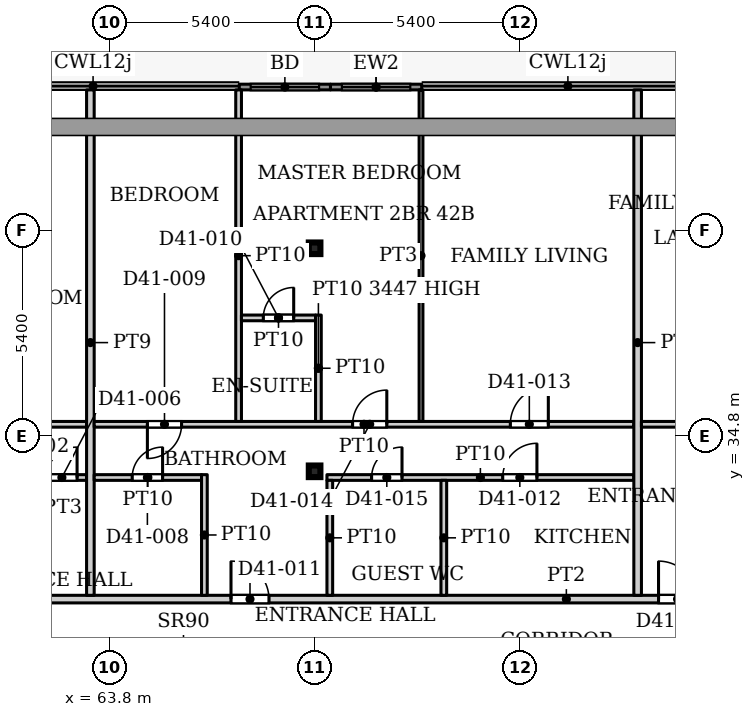
"""IFC4 building model, lengths in metres.
Left out: names, types, materials, properties, quantities, classifications, styles, units other than length and angle.
Written with IfcOpenShell. Run it as: python <this file> out.ifc"""

import sys

from ifc_helpers import new_model, si_unit, direction, frame, frame_2d, origin, origin_2d, place, context, subcontext, project, spatial, rectangle, hollow_rectangle, extrude, source, transform, mapped, element, fill, save


model = new_model("IFC4")
c1 = context("Model", 3, precision=1e-05, world=origin(), true_north=direction((0.0, 1.0)))
c2 = subcontext(c1, "Body", "Model", "MODEL_VIEW")
j1 = project(units=[si_unit("LENGTHUNIT", "METRE"), si_unit("PLANEANGLEUNIT", "RADIAN")], contexts=[c1])
p1 = place(None, origin())
s1 = spatial("IfcSite", under=j1, at=p1, CompositionType="ELEMENT")
p2 = place(p1, origin())
s2 = spatial("IfcBuilding", under=s1, at=p2, CompositionType="ELEMENT")
p3 = place(p2, frame((0.0, 0.0, 179.9)))
s3 = spatial("IfcBuildingStorey", under=s2, at=p3, CompositionType="ELEMENT", Elevation=179.9)
for number, where, z_axis, x_axis in (
    (1, (69.2, 33.863, 0.0), (0.0, 0.0, 1.0), (1.0, 0.0, 0.0)),
    (2, (69.2, 39.732, 0.0), (0.0, 0.0, 1.0), (1.0, 0.0, 0.0)),
):
    element("IfcColumn", number, at=place(p3, frame(where, z_axis=z_axis, x_axis=x_axis)), inside=s3, PredefinedType="COLUMN", context=c2, shape_type="SweptSolid", body=[
        extrude(hollow_rectangle(XDim=0.305, YDim=0.305, WallThickness=0.016, InnerFilletRadius=0.016, OuterFilletRadius=0.032, at=origin_2d()), origin(), (0.0, 0.0, 1.0), 3.9),
    ])
p4 = place(p3, frame((67.218, 43.975, 0.0), z_axis=(0.0, 0.0, 1.0), x_axis=(1.0, 0.0, 0.0)))
e3 = element("IfcWall", 3, at=p4, inside=s3, PredefinedType="SOLIDWALL", context=c2, shape_type="SweptSolid", body=[
    extrude(rectangle(XDim=2.4, YDim=0.15, at=frame_2d((1.2, 0.0))), origin(), (0.0, 0.0, 1.0), 3.75),
])
p5 = place(p4, frame((0.3, 0.0, 0.0)))
e4 = element("IfcOpeningElement", 4, at=p5, cuts=e3, PredefinedType="OPENING", context=c2, shape_type="SweptSolid", body=[
    extrude(rectangle(XDim=1.8, YDim=2.4, at=frame_2d((0.9, 1.2))), frame((0.0, 0.085, 0.0), z_axis=(0.0, -1.0, 0.0), x_axis=(1.0, 0.0, 0.0)), (0.0, 0.0, 1.0), 0.17),
])
p6 = place(p3, frame((69.618, 43.975, 0.0), z_axis=(0.0, 0.0, 1.0), x_axis=(1.0, 0.0, 0.0)))
e5 = element("IfcWall", 5, at=p6, inside=s3, PredefinedType="SOLIDWALL", context=c2, shape_type="SweptSolid", body=[
    extrude(rectangle(XDim=2.4, YDim=0.15, at=frame_2d((1.2, 0.0))), origin(), (0.0, 0.0, 1.0), 3.75),
])
p7 = place(p6, frame((0.3, 0.0, 0.0)))
e6 = element("IfcOpeningElement", 6, at=p7, cuts=e5, PredefinedType="OPENING", context=c2, shape_type="SweptSolid", body=[
    extrude(rectangle(XDim=1.8, YDim=2.4, at=frame_2d((0.9, 1.2))), frame((0.0, 0.085, 0.0), z_axis=(0.0, -1.0, 0.0), x_axis=(1.0, 0.0, 0.0)), (0.0, 0.0, 1.0), 0.17),
])
p8 = place(p3, frame((53.549, 30.5, 0.0), z_axis=(0.0, 0.0, 1.0), x_axis=(1.0, 0.0, 0.0)))
e7 = element("IfcWall", 7, at=p8, inside=s3, PredefinedType="PARTITIONING", context=c2, shape_type="SweptSolid", body=[
    extrude(rectangle(XDim=44.551, YDim=0.2, at=frame_2d((22.275, 0.0))), origin(), (0.0, 0.0, 1.0), 3.6),
])
p9 = place(p8, frame((6.851, 0.0, 0.0)))
e8 = element("IfcOpeningElement", 8, at=p9, cuts=e7, PredefinedType="OPENING", context=c2, shape_type="SweptSolid", body=[
    extrude(rectangle(XDim=1.0, YDim=2.1, at=frame_2d((0.5, 1.05))), frame((0.0, 0.11, 0.0), z_axis=(0.0, -1.0, 0.0), x_axis=(1.0, 0.0, 0.0)), (0.0, 0.0, 1.0), 0.22),
])
p10 = place(p8, frame((13.451, 0.0, 0.0)))
e9 = element("IfcOpeningElement", 9, at=p10, cuts=e7, PredefinedType="OPENING", context=c2, shape_type="SweptSolid", body=[
    extrude(rectangle(XDim=1.0, YDim=2.1, at=frame_2d((0.5, 1.05))), frame((0.0, 0.11, 0.0), z_axis=(0.0, -1.0, 0.0), x_axis=(1.0, 0.0, 0.0)), (0.0, 0.0, 1.0), 0.22),
])
p11 = place(p8, frame((24.701, 0.0, 0.0)))
e10 = element("IfcOpeningElement", 10, at=p11, cuts=e7, PredefinedType="OPENING", context=c2, shape_type="SweptSolid", body=[
    extrude(rectangle(XDim=1.0, YDim=2.1, at=frame_2d((0.5, 1.05))), frame((0.0, 0.11, 0.0), z_axis=(0.0, -1.0, 0.0), x_axis=(1.0, 0.0, 0.0)), (0.0, 0.0, 1.0), 0.22),
])
p12 = place(p8, frame((38.651, 0.0, 0.0)))
e11 = element("IfcOpeningElement", 11, at=p12, cuts=e7, PredefinedType="OPENING", context=c2, shape_type="SweptSolid", body=[
    extrude(rectangle(XDim=1.0, YDim=2.1, at=frame_2d((0.5, 1.05))), frame((0.0, 0.11, 0.0), z_axis=(0.0, -1.0, 0.0), x_axis=(1.0, 0.0, 0.0)), (0.0, 0.0, 1.0), 0.22),
])
p13 = place(p3, frame((53.549, 35.1, 0.0), z_axis=(0.0, 0.0, 1.0), x_axis=(1.0, 0.0, 0.0)))
e12 = element("IfcWall", 12, at=p13, inside=s3, PredefinedType="PARTITIONING", context=c2, shape_type="SweptSolid", body=[
    extrude(rectangle(XDim=9.651, YDim=0.15, at=frame_2d((4.825, 0.0))), origin(), (0.0, 0.0, 1.0), 3.6),
])
p14 = place(p13, frame((7.651, 0.0, 0.0)))
e13 = element("IfcOpeningElement", 13, at=p14, cuts=e12, PredefinedType="OPENING", context=c2, shape_type="SweptSolid", body=[
    extrude(rectangle(XDim=0.9, YDim=2.1, at=frame_2d((0.45, 1.05))), frame((0.0, 0.085, 0.0), z_axis=(0.0, -1.0, 0.0), x_axis=(1.0, 0.0, 0.0)), (0.0, 0.0, 1.0), 0.17),
])
p15 = place(p13, frame((2.651, 0.0, 0.0)))
e14 = element("IfcOpeningElement", 14, at=p15, cuts=e12, PredefinedType="OPENING", context=c2, shape_type="SweptSolid", body=[
    extrude(rectangle(XDim=1.0, YDim=2.1, at=frame_2d((0.5, 1.05))), frame((0.0, 0.085, 0.0), z_axis=(0.0, -1.0, 0.0), x_axis=(1.0, 0.0, 0.0)), (0.0, 0.0, 1.0), 0.17),
])
p16 = place(p3, frame((61.75, 33.7, 0.0), z_axis=(0.0, 0.0, 1.0), x_axis=(1.0, 0.0, 0.0)))
e15 = element("IfcWall", 15, at=p16, inside=s3, PredefinedType="PARTITIONING", context=c2, shape_type="SweptSolid", body=[
    extrude(rectangle(XDim=1.45, YDim=0.15, at=frame_2d((0.725, 0.0))), origin(), (0.0, 0.0, 1.0), 3.6),
])
p17 = place(p16, frame((0.4, 0.0, 0.0)))
e16 = element("IfcOpeningElement", 16, at=p17, cuts=e15, PredefinedType="OPENING", context=c2, shape_type="SweptSolid", body=[
    extrude(rectangle(XDim=0.8, YDim=2.1, at=frame_2d((0.4, 1.05))), frame((0.0, 0.085, 0.0), z_axis=(0.0, -1.0, 0.0), x_axis=(1.0, 0.0, 0.0)), (0.0, 0.0, 1.0), 0.17),
])
p18 = place(p3, frame((63.3, 30.6, 0.0), z_axis=(0.0, 0.0, 1.0), x_axis=(0.0, 1.0, 0.0)))
e17 = element("IfcWall", 17, at=p18, inside=s3, PredefinedType="PARTITIONING", context=c2, shape_type="SweptSolid", body=[
    extrude(rectangle(XDim=13.3, YDim=0.2, at=frame_2d((6.65, 0.0))), origin(), (0.0, 0.0, 1.0), 3.6),
])
p19 = place(p3, frame((63.4, 33.7, 0.0), z_axis=(0.0, 0.0, 1.0), x_axis=(1.0, 0.0, 0.0)))
e18 = element("IfcWall", 18, at=p19, inside=s3, PredefinedType="PARTITIONING", context=c2, shape_type="SweptSolid", body=[
    extrude(rectangle(XDim=2.825, YDim=0.15, at=frame_2d((1.413, 0.0))), origin(), (0.0, 0.0, 1.0), 3.6),
])
p20 = place(p19, frame((1.0, 0.0, 0.0)))
e19 = element("IfcOpeningElement", 19, at=p20, cuts=e18, PredefinedType="OPENING", context=c2, shape_type="SweptSolid", body=[
    extrude(rectangle(XDim=0.8, YDim=2.1, at=frame_2d((0.4, 1.05))), frame((0.0, 0.085, 0.0), z_axis=(0.0, -1.0, 0.0), x_axis=(1.0, 0.0, 0.0)), (0.0, 0.0, 1.0), 0.17),
])
p21 = place(p3, frame((63.4, 35.1, 0.0), z_axis=(0.0, 0.0, 1.0), x_axis=(1.0, 0.0, 0.0)))
e20 = element("IfcWall", 20, at=p21, inside=s3, PredefinedType="PARTITIONING", context=c2, shape_type="SweptSolid", body=[
    extrude(rectangle(XDim=14.2, YDim=0.15, at=frame_2d((7.1, 0.0))), origin(), (0.0, 0.0, 1.0), 3.6),
])
p22 = place(p21, frame((1.4, 0.0, 0.0)))
e21 = element("IfcOpeningElement", 21, at=p22, cuts=e20, PredefinedType="OPENING", context=c2, shape_type="SweptSolid", body=[
    extrude(rectangle(XDim=0.9, YDim=2.1, at=frame_2d((0.45, 1.05))), frame((0.0, 0.085, 0.0), z_axis=(0.0, -1.0, 0.0), x_axis=(1.0, 0.0, 0.0)), (0.0, 0.0, 1.0), 0.17),
])
p23 = place(p21, frame((10.95, 0.0, 0.0)))
e22 = element("IfcOpeningElement", 22, at=p23, cuts=e20, PredefinedType="OPENING", context=c2, shape_type="SweptSolid", body=[
    extrude(rectangle(XDim=1.0, YDim=2.1, at=frame_2d((0.5, 1.05))), frame((0.0, 0.085, 0.0), z_axis=(0.0, -1.0, 0.0), x_axis=(1.0, 0.0, 0.0)), (0.0, 0.0, 1.0), 0.17),
])
p24 = place(p21, frame((6.8, 0.0, 0.0)))
e23 = element("IfcOpeningElement", 23, at=p24, cuts=e20, PredefinedType="OPENING", context=c2, shape_type="SweptSolid", body=[
    extrude(rectangle(XDim=0.9, YDim=2.1, at=frame_2d((0.45, 1.05))), frame((0.0, 0.085, 0.0), z_axis=(0.0, -1.0, 0.0), x_axis=(1.0, 0.0, 0.0)), (0.0, 0.0, 1.0), 0.17),
])
p25 = place(p3, frame((66.3, 30.6, 0.0), z_axis=(0.0, 0.0, 1.0), x_axis=(0.0, 1.0, 0.0)))
e24 = element("IfcWall", 24, at=p25, inside=s3, PredefinedType="PARTITIONING", context=c2, shape_type="SweptSolid", body=[
    extrude(rectangle(XDim=3.175, YDim=0.15, at=frame_2d((1.587, 0.0))), origin(), (0.0, 0.0, 1.0), 3.6),
])
p26 = place(p3, frame((67.2, 35.175, 0.0), z_axis=(0.0, 0.0, 1.0), x_axis=(0.0, 1.0, 0.0)))
e25 = element("IfcWall", 25, at=p26, inside=s3, PredefinedType="PARTITIONING", context=c2, shape_type="SweptSolid", body=[
    extrude(rectangle(XDim=8.725, YDim=0.15, at=frame_2d((4.362, 0.0))), origin(), (0.0, 0.0, 1.0), 3.6),
])
p27 = place(p3, frame((67.275, 37.9, 0.0), z_axis=(0.0, 0.0, 1.0), x_axis=(1.0, 0.0, 0.0)))
e26 = element("IfcWall", 26, at=p27, inside=s3, PredefinedType="PARTITIONING", context=c2, shape_type="SweptSolid", body=[
    extrude(rectangle(XDim=1.95, YDim=0.15, at=frame_2d((0.975, 0.0))), origin(), (0.0, 0.0, 1.0), 3.6),
])
p28 = place(p27, frame((0.575, 0.0, 0.0)))
e27 = element("IfcOpeningElement", 27, at=p28, cuts=e26, PredefinedType="OPENING", context=c2, shape_type="SweptSolid", body=[
    extrude(rectangle(XDim=0.8, YDim=2.1, at=frame_2d((0.4, 1.05))), frame((0.0, 0.085, 0.0), z_axis=(0.0, -1.0, 0.0), x_axis=(1.0, 0.0, 0.0)), (0.0, 0.0, 1.0), 0.17),
])
p29 = place(p3, frame((69.3, 35.175, 0.0), z_axis=(0.0, 0.0, 1.0), x_axis=(0.0, 1.0, 0.0)))
e28 = element("IfcWall", 28, at=p29, inside=s3, PredefinedType="PARTITIONING", context=c2, shape_type="SweptSolid", body=[
    extrude(rectangle(XDim=2.8, YDim=0.15, at=frame_2d((1.4, 0.0))), origin(), (0.0, 0.0, 1.0), 3.447),
])
p30 = place(p3, frame((69.525, 33.7, 0.0), z_axis=(0.0, 0.0, 1.0), x_axis=(1.0, 0.0, 0.0)))
e29 = element("IfcWall", 29, at=p30, inside=s3, PredefinedType="PARTITIONING", context=c2, shape_type="SweptSolid", body=[
    extrude(rectangle(XDim=8.075, YDim=0.15, at=frame_2d((4.038, 0.0))), origin(), (0.0, 0.0, 1.0), 3.6),
])
p31 = place(p30, frame((4.625, 0.0, 0.0)))
e30 = element("IfcOpeningElement", 30, at=p31, cuts=e29, PredefinedType="OPENING", context=c2, shape_type="SweptSolid", body=[
    extrude(rectangle(XDim=0.9, YDim=2.1, at=frame_2d((0.45, 1.05))), frame((0.0, 0.085, 0.0), z_axis=(0.0, -1.0, 0.0), x_axis=(1.0, 0.0, 0.0)), (0.0, 0.0, 1.0), 0.17),
])
p32 = place(p30, frame((1.175, 0.0, 0.0)))
e31 = element("IfcOpeningElement", 31, at=p32, cuts=e29, PredefinedType="OPENING", context=c2, shape_type="SweptSolid", body=[
    extrude(rectangle(XDim=0.8, YDim=2.1, at=frame_2d((0.4, 1.05))), frame((0.0, 0.085, 0.0), z_axis=(0.0, -1.0, 0.0), x_axis=(1.0, 0.0, 0.0)), (0.0, 0.0, 1.0), 0.17),
])
p33 = place(p3, frame((69.6, 30.6, 0.0), z_axis=(0.0, 0.0, 1.0), x_axis=(0.0, 1.0, 0.0)))
e32 = element("IfcWall", 32, at=p33, inside=s3, PredefinedType="PARTITIONING", context=c2, shape_type="SweptSolid", body=[
    extrude(rectangle(XDim=3.025, YDim=0.15, at=frame_2d((1.512, 0.0))), origin(), (0.0, 0.0, 1.0), 3.6),
])
p34 = place(p3, frame((72.0, 35.175, 0.0), z_axis=(0.0, 0.0, 1.0), x_axis=(0.0, 1.0, 0.0)))
e33 = element("IfcWall", 33, at=p34, inside=s3, PredefinedType="PARTITIONING", context=c2, shape_type="SweptSolid", body=[
    extrude(rectangle(XDim=8.725, YDim=0.1, at=frame_2d((4.362, 0.0))), origin(), (0.0, 0.0, 1.0), 3.6),
])
p35 = place(p3, frame((72.6, 30.6, 0.0), z_axis=(0.0, 0.0, 1.0), x_axis=(0.0, 1.0, 0.0)))
e34 = element("IfcWall", 34, at=p35, inside=s3, PredefinedType="PARTITIONING", context=c2, shape_type="SweptSolid", body=[
    extrude(rectangle(XDim=3.025, YDim=0.15, at=frame_2d((1.512, 0.0))), origin(), (0.0, 0.0, 1.0), 3.6),
])
p36 = place(p3, frame((77.7, 30.6, 0.0), z_axis=(0.0, 0.0, 1.0), x_axis=(0.0, 1.0, 0.0)))
e35 = element("IfcWall", 35, at=p36, inside=s3, PredefinedType="PARTITIONING", context=c2, shape_type="SweptSolid", body=[
    extrude(rectangle(XDim=13.3, YDim=0.2, at=frame_2d((6.65, 0.0))), origin(), (0.0, 0.0, 1.0), 3.6),
])
p37 = place(p3, frame((77.8, 35.1, 0.0), z_axis=(0.0, 0.0, 1.0), x_axis=(1.0, 0.0, 0.0)))
e36 = element("IfcWall", 36, at=p37, inside=s3, PredefinedType="PARTITIONING", context=c2, shape_type="SweptSolid", body=[
    extrude(rectangle(XDim=11.8, YDim=0.15, at=frame_2d((5.9, 0.0))), origin(), (0.0, 0.0, 1.0), 3.6),
])
p38 = place(p37, frame((5.6, 0.0, 0.0)))
e37 = element("IfcOpeningElement", 37, at=p38, cuts=e36, PredefinedType="OPENING", context=c2, shape_type="SweptSolid", body=[
    extrude(rectangle(XDim=0.9, YDim=2.1, at=frame_2d((0.45, 1.05))), frame((0.0, 0.085, 0.0), z_axis=(0.0, -1.0, 0.0), x_axis=(1.0, 0.0, 0.0)), (0.0, 0.0, 1.0), 0.17),
])
p39 = place(p37, frame((1.5, 0.0, 0.0)))
e38 = element("IfcOpeningElement", 38, at=p39, cuts=e36, PredefinedType="OPENING", context=c2, shape_type="SweptSolid", body=[
    extrude(rectangle(XDim=1.0, YDim=2.1, at=frame_2d((0.5, 1.05))), frame((0.0, 0.085, 0.0), z_axis=(0.0, -1.0, 0.0), x_axis=(1.0, 0.0, 0.0)), (0.0, 0.0, 1.0), 0.17),
])
p40 = place(p37, frame((8.45, 0.0, 0.0)))
e39 = element("IfcOpeningElement", 39, at=p40, cuts=e36, PredefinedType="OPENING", context=c2, shape_type="SweptSolid", body=[
    extrude(rectangle(XDim=0.9, YDim=2.1, at=frame_2d((0.45, 1.05))), frame((0.0, 0.085, 0.0), z_axis=(0.0, -1.0, 0.0), x_axis=(1.0, 0.0, 0.0)), (0.0, 0.0, 1.0), 0.17),
])
m1 = source(origin(), c2, "Body", "SweptSolid", [
    extrude(rectangle(XDim=1.8, YDim=2.4, at=frame_2d((0.9, 1.2))), frame((0.0, 0.025, 0.0), z_axis=(0.0, -1.0, 0.0), x_axis=(1.0, 0.0, 0.0)), (0.0, 0.0, 1.0), 0.05),
])
p41 = place(p5, origin())
e40 = element("IfcDoor", 40, at=p41, inside=s3, OperationType="SLIDING_TO_LEFT", PredefinedType="DOOR", context=c2, shape_type="MappedRepresentation", body=[
    mapped(m1, transform((0.0, 0.0, 0.0), x_axis=(1.0, 0.0, 0.0), y_axis=(0.0, 1.0, 0.0), z_axis=(0.0, 0.0, 1.0), scale=1.0)),
])
fill(e4, e40)
p42 = place(p7, origin())
e41 = element("IfcDoor", 41, at=p42, inside=s3, OperationType="SLIDING_TO_LEFT", PredefinedType="DOOR", context=c2, shape_type="MappedRepresentation", body=[
    mapped(m1, transform((0.0, 0.0, 0.0), x_axis=(1.0, 0.0, 0.0), y_axis=(0.0, 1.0, 0.0), z_axis=(0.0, 0.0, 1.0), scale=1.0)),
])
fill(e6, e41)
m2 = source(origin(), c2, "Body", "SweptSolid", [
    extrude(rectangle(XDim=0.8, YDim=2.1, at=frame_2d((0.4, 1.05))), frame((0.0, 0.025, 0.0), z_axis=(0.0, -1.0, 0.0), x_axis=(1.0, 0.0, 0.0)), (0.0, 0.0, 1.0), 0.05),
])
p43 = place(p17, origin())
e42 = element("IfcDoor", 42, at=p43, inside=s3, OperationType="SINGLE_SWING_LEFT", PredefinedType="DOOR", context=c2, shape_type="MappedRepresentation", body=[
    mapped(m2, transform((0.0, 0.0, 0.0), x_axis=(1.0, 0.0, 0.0), y_axis=(0.0, 1.0, 0.0), z_axis=(0.0, 0.0, 1.0), scale=1.0)),
])
fill(e16, e42)
p44 = place(p20, origin())
e43 = element("IfcDoor", 43, at=p44, inside=s3, OperationType="SINGLE_SWING_LEFT", PredefinedType="DOOR", context=c2, shape_type="MappedRepresentation", body=[
    mapped(m2, transform((0.0, 0.0, 0.0), x_axis=(1.0, 0.0, 0.0), y_axis=(0.0, 1.0, 0.0), z_axis=(0.0, 0.0, 1.0), scale=1.0)),
])
fill(e19, e43)
m3 = source(origin(), c2, "Body", "SweptSolid", [
    extrude(rectangle(XDim=0.9, YDim=2.1, at=frame_2d((0.45, 1.05))), frame((0.0, 0.025, 0.0), z_axis=(0.0, -1.0, 0.0), x_axis=(1.0, 0.0, 0.0)), (0.0, 0.0, 1.0), 0.05),
])
p45 = place(p22, origin())
e44 = element("IfcDoor", 44, at=p45, inside=s3, OperationType="SINGLE_SWING_RIGHT", PredefinedType="DOOR", context=c2, shape_type="MappedRepresentation", body=[
    mapped(m3, transform((0.0, 0.0, 0.0), x_axis=(1.0, 0.0, 0.0), y_axis=(0.0, 1.0, 0.0), z_axis=(0.0, 0.0, 1.0), scale=1.0)),
])
fill(e21, e44)
p46 = place(p28, origin())
e45 = element("IfcDoor", 45, at=p46, inside=s3, OperationType="SINGLE_SWING_LEFT", PredefinedType="DOOR", context=c2, shape_type="MappedRepresentation", body=[
    mapped(m2, transform((0.0, 0.0, 0.0), x_axis=(1.0, 0.0, 0.0), y_axis=(0.0, 1.0, 0.0), z_axis=(0.0, 0.0, 1.0), scale=1.0)),
])
fill(e27, e45)
m4 = source(origin(), c2, "Body", "SweptSolid", [
    extrude(rectangle(XDim=1.0, YDim=2.1, at=frame_2d((0.5, 1.05))), frame((0.0, 0.025, 0.0), z_axis=(0.0, -1.0, 0.0), x_axis=(1.0, 0.0, 0.0)), (0.0, 0.0, 1.0), 0.05),
])
p47 = place(p10, origin())
e46 = element("IfcDoor", 46, at=p47, inside=s3, OperationType="SINGLE_SWING_LEFT", PredefinedType="DOOR", context=c2, shape_type="MappedRepresentation", body=[
    mapped(m4, transform((0.0, 0.0, 0.0), x_axis=(1.0, 0.0, 0.0), y_axis=(0.0, 1.0, 0.0), z_axis=(0.0, 0.0, 1.0), scale=1.0)),
])
fill(e9, e46)
p48 = place(p31, origin())
e47 = element("IfcDoor", 47, at=p48, inside=s3, OperationType="SINGLE_SWING_LEFT", PredefinedType="DOOR", context=c2, shape_type="MappedRepresentation", body=[
    mapped(m3, transform((0.0, 0.0, 0.0), x_axis=(1.0, 0.0, 0.0), y_axis=(0.0, 1.0, 0.0), z_axis=(0.0, 0.0, 1.0), scale=1.0)),
])
fill(e30, e47)
m5 = source(origin(), c2, "Body", "SweptSolid", [
    extrude(rectangle(XDim=1.0, YDim=2.1, at=frame_2d((0.5, 1.05))), frame((0.0, 0.025, 0.0), z_axis=(0.0, -1.0, 0.0), x_axis=(1.0, 0.0, 0.0)), (0.0, 0.0, 1.0), 0.05),
])
p49 = place(p23, origin())
e48 = element("IfcDoor", 48, at=p49, inside=s3, OperationType="SINGLE_SWING_LEFT", PredefinedType="DOOR", context=c2, shape_type="MappedRepresentation", body=[
    mapped(m5, transform((0.0, 0.0, 0.0), x_axis=(1.0, 0.0, 0.0), y_axis=(0.0, 1.0, 0.0), z_axis=(0.0, 0.0, 1.0), scale=1.0)),
])
fill(e22, e48)
p50 = place(p24, origin())
e49 = element("IfcDoor", 49, at=p50, inside=s3, OperationType="SINGLE_SWING_LEFT", PredefinedType="DOOR", context=c2, shape_type="MappedRepresentation", body=[
    mapped(m3, transform((0.0, 0.0, 0.0), x_axis=(1.0, 0.0, 0.0), y_axis=(0.0, 1.0, 0.0), z_axis=(0.0, 0.0, 1.0), scale=1.0)),
])
fill(e23, e49)
p51 = place(p32, origin())
e50 = element("IfcDoor", 50, at=p51, inside=s3, OperationType="SINGLE_SWING_LEFT", PredefinedType="DOOR", context=c2, shape_type="MappedRepresentation", body=[
    mapped(m2, transform((0.0, 0.0, 0.0), x_axis=(1.0, 0.0, 0.0), y_axis=(0.0, 1.0, 0.0), z_axis=(0.0, 0.0, 1.0), scale=1.0)),
])
fill(e31, e50)
p52 = place(p11, origin())
e51 = element("IfcDoor", 51, at=p52, inside=s3, OperationType="SINGLE_SWING_LEFT", PredefinedType="DOOR", context=c2, shape_type="MappedRepresentation", body=[
    mapped(m4, transform((0.0, 0.0, 0.0), x_axis=(1.0, 0.0, 0.0), y_axis=(0.0, 1.0, 0.0), z_axis=(0.0, 0.0, 1.0), scale=1.0)),
])
fill(e10, e51)
save(model, sys.argv[1])
